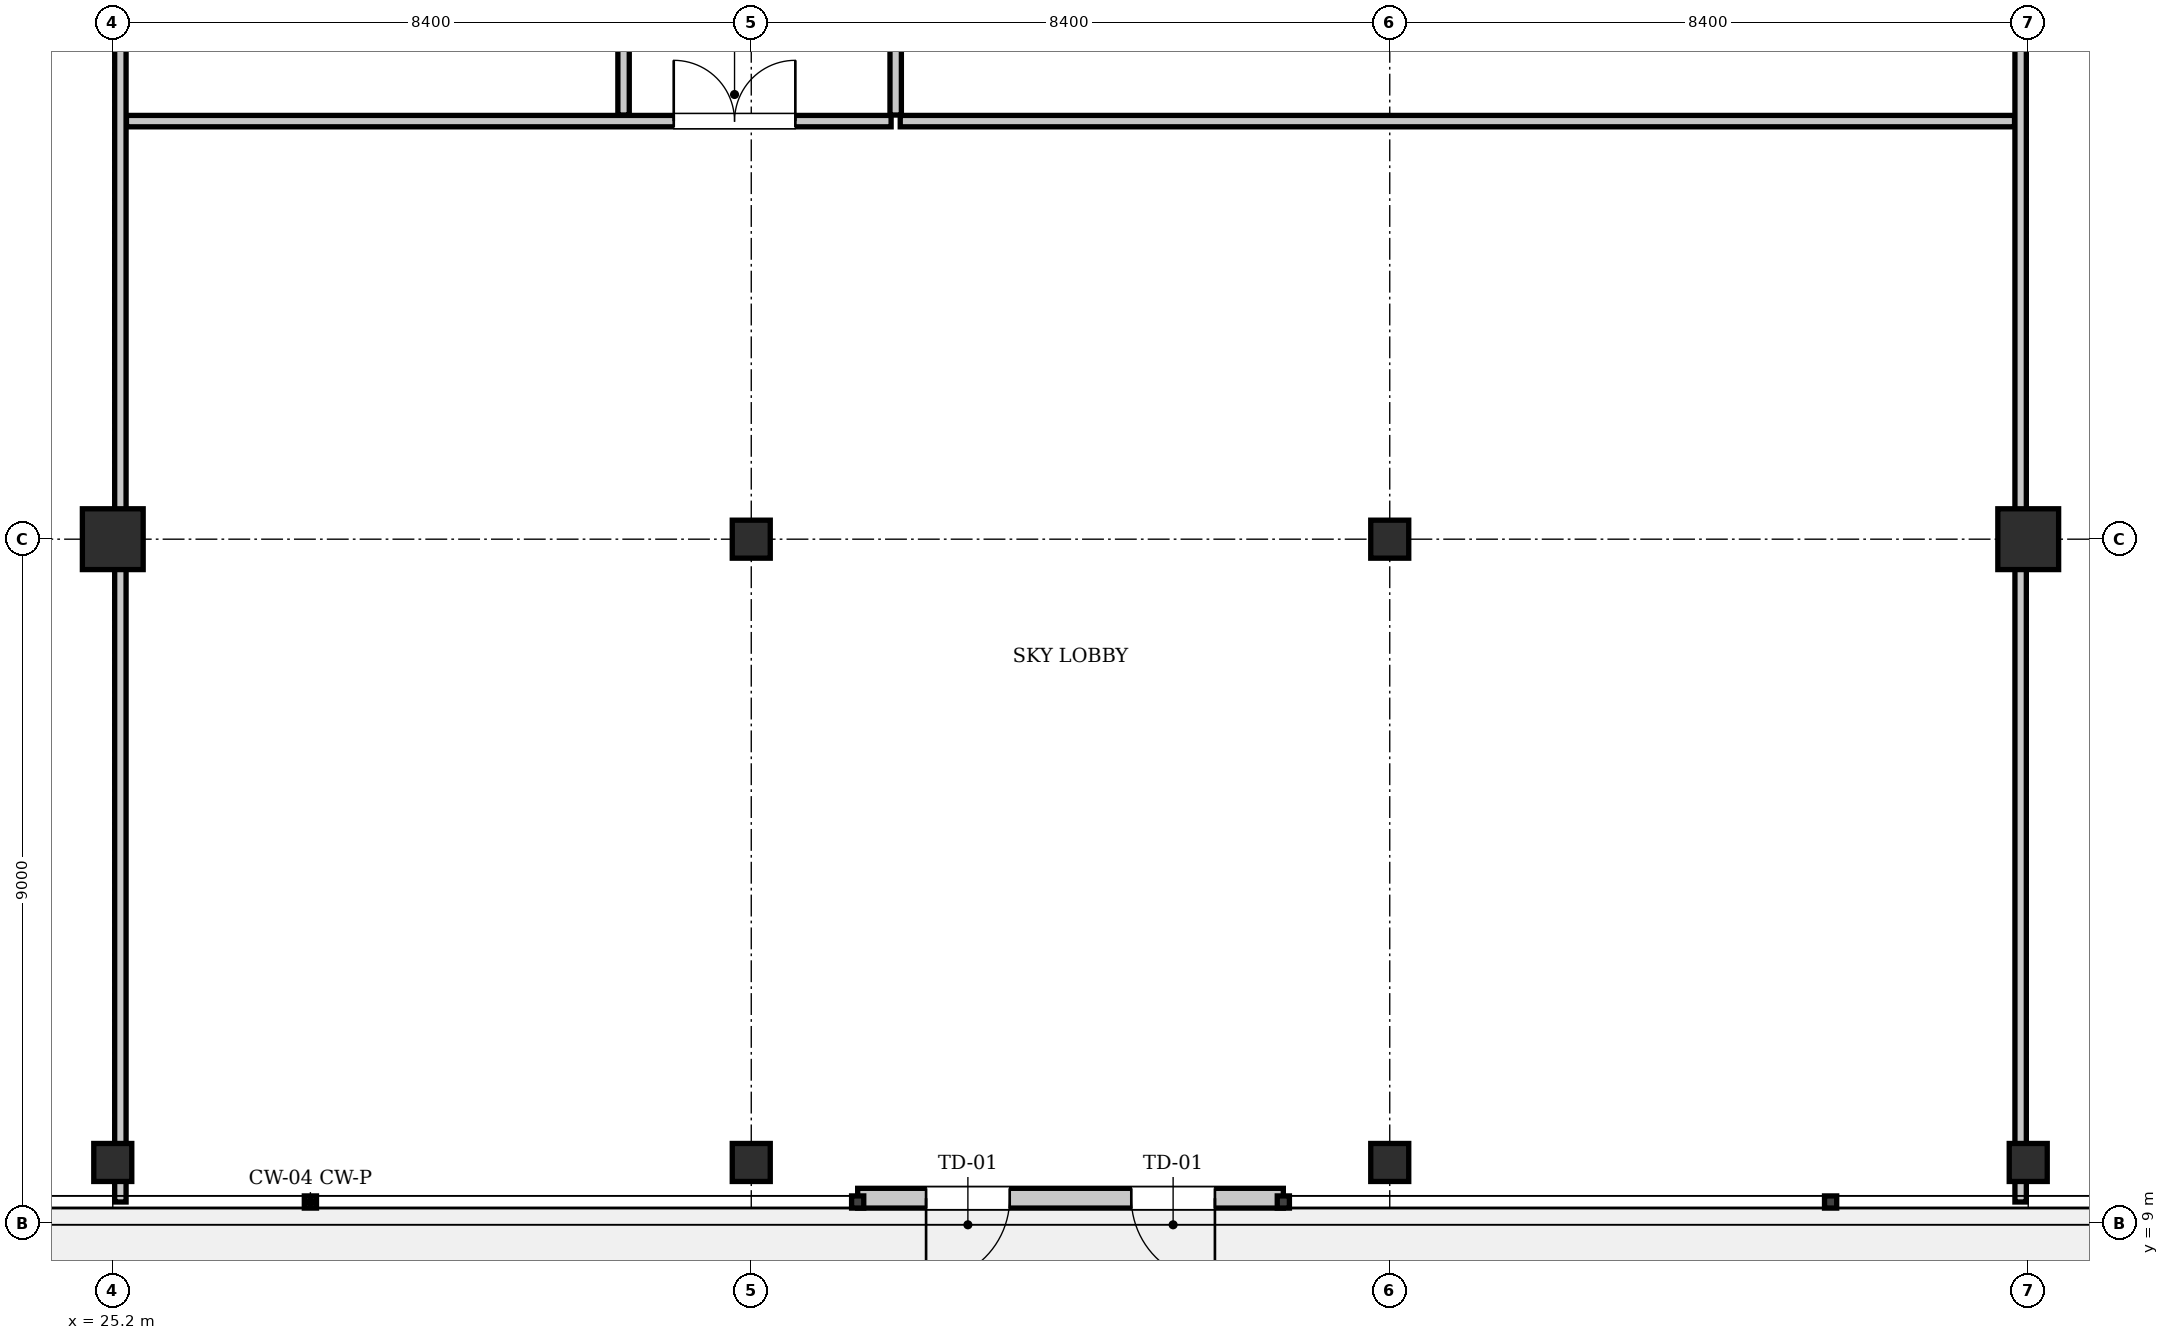
"""IFC4 building model, lengths in metres.
Left out: names, types, materials, properties, quantities, classifications, styles, units other than length and angle.
Written with IfcOpenShell. Run it as: python <this file> out.ifc"""

import sys

from ifc_helpers import new_model, si_unit, direction, frame, frame_2d, origin, origin_2d, place, context, subcontext, project, spatial, rectangle, i_section, extrude, element, fill, save


model = new_model("IFC4")
c1 = context("Model", 3, precision=1e-05, world=origin(), true_north=direction((0.0, 1.0)))
c2 = subcontext(c1, "Body", "Model", "MODEL_VIEW")
j1 = project(units=[si_unit("LENGTHUNIT", "METRE"), si_unit("PLANEANGLEUNIT", "RADIAN")], contexts=[c1])
p1 = place(None, origin())
s1 = spatial("IfcSite", under=j1, at=p1, CompositionType="ELEMENT")
p2 = place(p1, origin())
s2 = spatial("IfcBuilding", under=s1, at=p2, CompositionType="ELEMENT")
p3 = place(p2, frame((0.0, 0.0, 234.5)))
s3 = spatial("IfcBuildingStorey", under=s2, at=p3, CompositionType="ELEMENT", Elevation=234.5)
for number, where, z_axis, x_axis in (
    (1, (25.2, 18.0, 0.0), (0.0, 0.0, 1.0), (1.0, 0.0, 0.0)),
    (2, (50.4, 18.0, 0.0), (0.0, 0.0, 1.0), (1.0, 0.0, 0.0)),
):
    element("IfcColumn", number, at=place(p3, frame(where, z_axis=z_axis, x_axis=x_axis)), inside=s3, PredefinedType="COLUMN", context=c2, shape_type="SweptSolid", body=[
        extrude(rectangle(XDim=0.8, YDim=0.8, at=origin_2d()), origin(), (0.0, 0.0, 1.0), 4.9),
    ])
for number, where, z_axis, x_axis in (
    (3, (33.6, 18.0, 0.0), (0.0, 0.0, 1.0), (1.0, 0.0, 0.0)),
    (4, (42.0, 18.0, 0.0), (0.0, 0.0, 1.0), (1.0, 0.0, 0.0)),
):
    element("IfcColumn", number, at=place(p3, frame(where, z_axis=z_axis, x_axis=x_axis)), inside=s3, PredefinedType="COLUMN", context=c2, shape_type="SweptSolid", body=[
        extrude(i_section(OverallWidth=0.5, OverallDepth=0.5, WebThickness=0.022, FlangeThickness=0.032, at=origin_2d()), origin(), (0.0, 0.0, 1.0), 4.9),
    ])
for number, where, z_axis, x_axis in (
    (5, (25.2, 9.8, -0.24), (0.0, 0.0, 1.0), (1.0, 0.0, 0.0)),
    (6, (33.6, 9.8, -0.24), (0.0, 0.0, 1.0), (1.0, 0.0, 0.0)),
    (7, (42.0, 9.8, -0.24), (0.0, 0.0, 1.0), (1.0, 0.0, 0.0)),
    (8, (50.4, 9.8, -0.24), (0.0, 0.0, 1.0), (1.0, 0.0, 0.0)),
):
    element("IfcColumn", number, at=place(p3, frame(where, z_axis=z_axis, x_axis=x_axis)), inside=s3, PredefinedType="COLUMN", context=c2, shape_type="SweptSolid", body=[
        extrude(i_section(OverallWidth=0.5, OverallDepth=0.5, WebThickness=0.022, FlangeThickness=0.032, at=origin_2d()), origin(), (0.0, 0.0, 1.0), 5.14),
    ])
p4 = place(p3, frame((40.6, 9.33, 0.0), z_axis=(0.0, 0.0, 1.0), x_axis=(-1.0, 0.0, 0.0)))
e9 = element("IfcWall", 9, at=p4, inside=s3, PredefinedType="SOLIDWALL", context=c2, shape_type="SweptSolid", body=[
    extrude(rectangle(XDim=5.6, YDim=0.26, at=frame_2d((2.8, 0.0))), origin(), (0.0, 0.0, 1.0), 4.66),
])
p5 = place(p4, frame((0.9, 0.0, 0.0)))
e10 = element("IfcOpeningElement", 10, at=p5, cuts=e9, PredefinedType="OPENING", context=c2, shape_type="SweptSolid", body=[
    extrude(rectangle(XDim=1.1, YDim=2.2, at=frame_2d((0.55, 1.1))), frame((0.0, 0.14, 0.0), z_axis=(0.0, -1.0, 0.0), x_axis=(1.0, 0.0, 0.0)), (0.0, 0.0, 1.0), 0.28),
])
p6 = place(p4, frame((3.6, 0.0, 0.0)))
e11 = element("IfcOpeningElement", 11, at=p6, cuts=e9, PredefinedType="OPENING", context=c2, shape_type="SweptSolid", body=[
    extrude(rectangle(XDim=1.1, YDim=2.2, at=frame_2d((0.55, 1.1))), frame((0.0, 0.14, 0.0), z_axis=(0.0, -1.0, 0.0), x_axis=(1.0, 0.0, 0.0)), (0.0, 0.0, 1.0), 0.28),
])
p7 = place(p3, frame((25.38, 23.5, 0.0), z_axis=(0.0, 0.0, 1.0), x_axis=(1.0, 0.0, 0.0)))
e12 = element("IfcWall", 12, at=p7, inside=s3, PredefinedType="PARTITIONING", context=c2, shape_type="SweptSolid", body=[
    extrude(rectangle(XDim=10.06, YDim=0.15, at=frame_2d((5.03, 0.0))), origin(), (0.0, 0.0, 1.0), 4.66),
])
p8 = place(p7, frame((7.2, 0.0, 0.0)))
e13 = element("IfcOpeningElement", 13, at=p8, cuts=e12, PredefinedType="OPENING", context=c2, shape_type="SweptSolid", body=[
    extrude(rectangle(XDim=1.6, YDim=2.3, at=frame_2d((0.8, 1.15))), frame((0.0, 0.085, 0.0), z_axis=(0.0, -1.0, 0.0), x_axis=(1.0, 0.0, 0.0)), (0.0, 0.0, 1.0), 0.17),
])
p9 = place(p3, frame((35.56, 23.5, 0.0), z_axis=(0.0, 0.0, 1.0), x_axis=(1.0, 0.0, 0.0)))
e14 = element("IfcWall", 14, at=p9, inside=s3, PredefinedType="PARTITIONING", context=c2, shape_type="SweptSolid", body=[
    extrude(rectangle(XDim=14.66, YDim=0.15, at=frame_2d((7.33, 0.0))), origin(), (0.0, 0.0, 1.0), 4.66),
])
p10 = place(p3, frame((35.5, 23.58, 0.0), z_axis=(0.0, 0.0, 1.0), x_axis=(0.0, 1.0, 0.0)))
e15 = element("IfcWall", 15, at=p10, inside=s3, PredefinedType="PARTITIONING", context=c2, shape_type="SweptSolid", body=[
    extrude(rectangle(XDim=9.1, YDim=0.15, at=frame_2d((4.55, 0.0))), origin(), (0.0, 0.0, 1.0), 4.66),
])
p11 = place(p3, frame((31.92, 23.58, 0.0), z_axis=(0.0, 0.0, 1.0), x_axis=(0.0, 1.0, 0.0)))
e16 = element("IfcWall", 16, at=p11, inside=s3, PredefinedType="PARTITIONING", context=c2, shape_type="SweptSolid", body=[
    extrude(rectangle(XDim=5.78, YDim=0.15, at=frame_2d((2.89, 0.0))), origin(), (0.0, 0.0, 1.0), 4.66),
])
p12 = place(p11, frame((2.44, 0.0, 0.0)))
e17 = element("IfcOpeningElement", 17, at=p12, cuts=e16, PredefinedType="OPENING", context=c2, shape_type="SweptSolid", body=[
    extrude(rectangle(XDim=0.9, YDim=2.1, at=frame_2d((0.45, 1.05))), frame((0.0, 0.085, 0.0), z_axis=(0.0, -1.0, 0.0), x_axis=(1.0, 0.0, 0.0)), (0.0, 0.0, 1.0), 0.17),
])
for number, where, z_axis, x_axis in (
    (18, (25.3, 9.28, 0.0), (0.0, 0.0, 1.0), (0.0, 1.0, 0.0)),
    (19, (50.3, 9.28, 0.0), (0.0, 0.0, 1.0), (0.0, 1.0, 0.0)),
):
    element("IfcWall", number, at=place(p3, frame(where, z_axis=z_axis, x_axis=x_axis)), inside=s3, PredefinedType="PARTITIONING", context=c2, shape_type="SweptSolid", body=[
        extrude(rectangle(XDim=23.44, YDim=0.15, at=frame_2d((11.72, 0.0))), origin(), (0.0, 0.0, 1.0), 4.127),
    ])
p13 = place(p5, origin())
e20 = element("IfcDoor", 20, at=p13, inside=s3, OperationType="SINGLE_SWING_LEFT", PredefinedType="DOOR", context=c2, shape_type="SweptSolid", body=[
    extrude(rectangle(XDim=1.1, YDim=2.2, at=frame_2d((0.55, 1.1))), frame((0.0, 0.025, 0.0), z_axis=(0.0, -1.0, 0.0), x_axis=(1.0, 0.0, 0.0)), (0.0, 0.0, 1.0), 0.05),
])
fill(e10, e20)
p14 = place(p6, origin())
e21 = element("IfcDoor", 21, at=p14, inside=s3, OperationType="SINGLE_SWING_RIGHT", PredefinedType="DOOR", context=c2, shape_type="SweptSolid", body=[
    extrude(rectangle(XDim=1.1, YDim=2.2, at=frame_2d((0.55, 1.1))), frame((0.0, 0.025, 0.0), z_axis=(0.0, -1.0, 0.0), x_axis=(1.0, 0.0, 0.0)), (0.0, 0.0, 1.0), 0.05),
])
fill(e11, e21)
p15 = place(p8, origin())
e22 = element("IfcDoor", 22, at=p15, inside=s3, OperationType="DOUBLE_DOOR_SINGLE_SWING", PredefinedType="DOOR", context=c2, shape_type="SweptSolid", body=[
    extrude(rectangle(XDim=1.6, YDim=2.3, at=frame_2d((0.8, 1.15))), frame((0.0, 0.025, 0.0), z_axis=(0.0, -1.0, 0.0), x_axis=(1.0, 0.0, 0.0)), (0.0, 0.0, 1.0), 0.05),
])
fill(e13, e22)
save(model, sys.argv[1])
